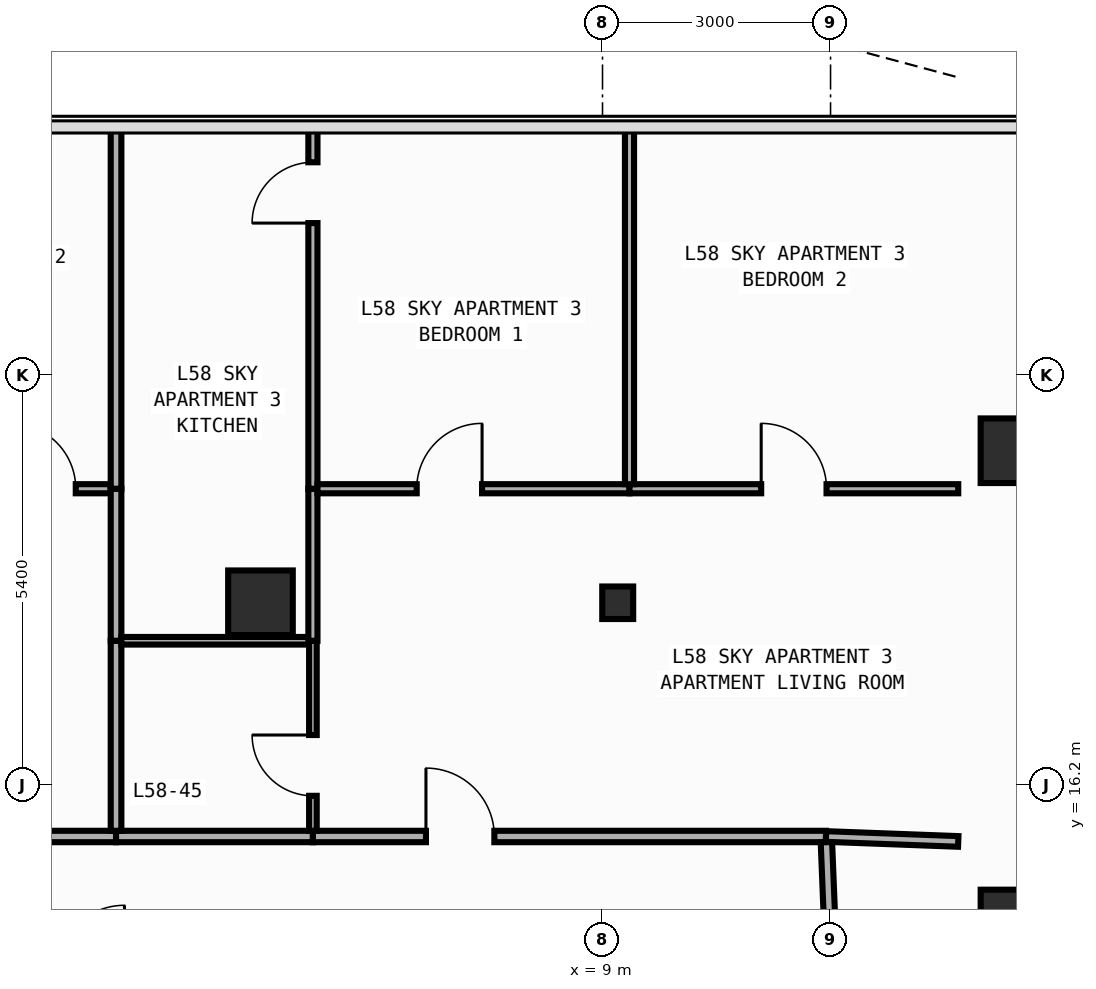
"""IFC4 building model, lengths in metres.
Left out: names, types, materials, properties, quantities, classifications, styles, units other than length and angle.
Written with IfcOpenShell. Run it as: python <this file> out.ifc"""

import sys

from ifc_helpers import new_model, si_unit, direction, frame, frame_2d, origin, origin_2d, place, context, subcontext, project, spatial, rectangle, i_section, extrude, element, fill, save


model = new_model("IFC4")
c1 = context("Model", 3, precision=1e-05, world=origin(), true_north=direction((0.0, 1.0)))
c2 = subcontext(c1, "Body", "Model", "MODEL_VIEW")
j1 = project(units=[si_unit("LENGTHUNIT", "METRE"), si_unit("PLANEANGLEUNIT", "RADIAN")], contexts=[c1])
p1 = place(None, origin())
s1 = spatial("IfcSite", under=j1, at=p1, CompositionType="ELEMENT")
p2 = place(p1, origin())
s2 = spatial("IfcBuilding", under=s1, at=p2, CompositionType="ELEMENT")
p3 = place(p2, frame((0.0, 0.0, 247.6)))
s3 = spatial("IfcBuildingStorey", under=s2, at=p3, CompositionType="ELEMENT", Elevation=247.6)
p4 = place(p3, frame((9.2, 18.6, 0.0), z_axis=(0.0, 0.0, 1.0), x_axis=(1.0, 0.0, 0.0)))
e1 = element("IfcColumn", 1, at=p4, inside=s3, PredefinedType="COLUMN", context=c2, shape_type="SweptSolid", body=[
    extrude(i_section(OverallWidth=0.407, OverallDepth=0.428, WebThickness=0.02, FlangeThickness=0.035, FilletRadius=0.022, at=origin_2d()), origin(), (0.0, 0.0, 1.0), 3.6),
])
for number, where, z_axis, x_axis in (
    (2, (14.4, 14.4, 0.0), (0.0, 0.0, 1.0), (1.0, 0.0, 0.0)),
    (3, (4.5, 18.6, 0.0), (0.0, 0.0, 1.0), (1.0, 0.0, 0.0)),
    (4, (14.4, 20.6, 0.0), (0.0, 0.0, 1.0), (1.0, 0.0, 0.0)),
):
    element("IfcColumn", number, at=place(p3, frame(where, z_axis=z_axis, x_axis=x_axis)), inside=s3, PredefinedType="COLUMN", context=c2, shape_type="SweptSolid", body=[
        extrude(rectangle(XDim=0.85, YDim=0.85, at=origin_2d()), origin(), (0.0, 0.0, 1.0), 3.6),
    ])
p5 = place(p3, frame((-5.51, 15.525, 0.0), z_axis=(0.0, 0.0, 1.0), x_axis=(1.0, 0.0, 0.0)))
e5 = element("IfcWall", 5, at=p5, inside=s3, PredefinedType="PARTITIONING", context=c2, shape_type="SweptSolid", body=[
    extrude(rectangle(XDim=8.11, YDim=0.15, at=frame_2d((4.055, 0.0))), origin(), (0.0, 0.0, 1.0), 3.34),
])
p6 = place(p5, frame((2.895, 0.0, 0.0)))
e6 = element("IfcOpeningElement", 6, at=p6, cuts=e5, PredefinedType="OPENING", context=c2, shape_type="SweptSolid", body=[
    extrude(rectangle(XDim=0.9, YDim=2.15, at=frame_2d((0.45, 1.075))), frame((0.0, 0.085, 0.0), z_axis=(0.0, -1.0, 0.0), x_axis=(1.0, 0.0, 0.0)), (0.0, 0.0, 1.0), 0.17),
])
p7 = place(p3, frame((2.6, 15.525, 0.0), z_axis=(0.0, 0.0, 1.0), x_axis=(1.0, 0.0, 0.0)))
e7 = element("IfcWall", 7, at=p7, inside=s3, PredefinedType="PARTITIONING", context=c2, shape_type="SweptSolid", body=[
    extrude(rectangle(XDim=2.59, YDim=0.15, at=frame_2d((1.295, 0.0))), origin(), (0.0, 0.0, 1.0), 3.34),
])
p8 = place(p3, frame((5.19, 15.525, 0.0), z_axis=(0.0, 0.0, 1.0), x_axis=(1.0, 0.0, 0.0)))
e8 = element("IfcWall", 8, at=p8, inside=s3, PredefinedType="PARTITIONING", context=c2, shape_type="SweptSolid", body=[
    extrude(rectangle(XDim=6.75, YDim=0.15, at=frame_2d((3.375, 0.0))), origin(), (0.0, 0.0, 1.0), 3.34),
])
p9 = place(p8, frame((1.487, 0.0, 0.0)))
e9 = element("IfcOpeningElement", 9, at=p9, cuts=e8, PredefinedType="OPENING", context=c2, shape_type="SweptSolid", body=[
    extrude(rectangle(XDim=0.9, YDim=2.15, at=frame_2d((0.45, 1.075))), frame((0.0, 0.085, 0.0), z_axis=(0.0, -1.0, 0.0), x_axis=(1.0, 0.0, 0.0)), (0.0, 0.0, 1.0), 0.17),
])
p10 = place(p3, frame((12.015, 13.72, 0.0), z_axis=(0.0, 0.0, 1.0), x_axis=(-0.040046877756, 0.99919780203, 0.0)))
e10 = element("IfcWall", 10, at=p10, inside=s3, PredefinedType="PARTITIONING", context=c2, shape_type="SweptSolid", body=[
    extrude(rectangle(XDim=1.731, YDim=0.15, at=frame_2d((0.866, 0.0))), origin(), (0.0, 0.0, 1.0), 3.34),
])
p11 = place(p3, frame((-1.495, 20.1, 0.0), z_axis=(0.0, 0.0, 1.0), x_axis=(1.0, 0.0, 0.0)))
e11 = element("IfcWall", 11, at=p11, inside=s3, PredefinedType="PARTITIONING", context=c2, shape_type="SweptSolid", body=[
    extrude(rectangle(XDim=4.025, YDim=0.12, at=frame_2d((2.013, 0.0))), origin(), (0.0, 0.0, 1.0), 3.34),
])
p12 = place(p11, frame((2.705, 0.0, 0.0)))
e12 = element("IfcOpeningElement", 12, at=p12, cuts=e11, PredefinedType="OPENING", context=c2, shape_type="SweptSolid", body=[
    extrude(rectangle(XDim=0.86, YDim=2.15, at=frame_2d((0.43, 1.075))), frame((0.0, 0.07, 0.0), z_axis=(0.0, -1.0, 0.0), x_axis=(1.0, 0.0, 0.0)), (0.0, 0.0, 1.0), 0.14),
])
p13 = place(p3, frame((2.6, 15.6, 0.0), z_axis=(0.0, 0.0, 1.0), x_axis=(0.0, 1.0, 0.0)))
e13 = element("IfcWall", 13, at=p13, inside=s3, PredefinedType="PARTITIONING", context=c2, shape_type="SweptSolid", body=[
    extrude(rectangle(XDim=2.5, YDim=0.14, at=frame_2d((1.25, 0.0))), origin(), (0.0, 0.0, 1.0), 3.34),
])
p14 = place(p3, frame((2.6, 18.1, 0.0), z_axis=(0.0, 0.0, 1.0), x_axis=(0.0, 1.0, 0.0)))
e14 = element("IfcWall", 14, at=p14, inside=s3, PredefinedType="PARTITIONING", context=c2, shape_type="SweptSolid", body=[
    extrude(rectangle(XDim=2.0, YDim=0.14, at=frame_2d((1.0, 0.0))), origin(), (0.0, 0.0, 1.0), 3.34),
])
p15 = place(p3, frame((2.6, 20.1, 0.0), z_axis=(0.0, 0.0, 1.0), x_axis=(0.0, 1.0, 0.0)))
e15 = element("IfcWall", 15, at=p15, inside=s3, PredefinedType="PARTITIONING", context=c2, shape_type="SweptSolid", body=[
    extrude(rectangle(XDim=4.755, YDim=0.14, at=frame_2d((2.377, 0.0))), origin(), (0.0, 0.0, 1.0), 3.34),
])
p16 = place(p3, frame((2.67, 18.1, 0.0), z_axis=(0.0, 0.0, 1.0), x_axis=(1.0, 0.0, 0.0)))
e16 = element("IfcWall", 16, at=p16, inside=s3, PredefinedType="PARTITIONING", context=c2, shape_type="SweptSolid", body=[
    extrude(rectangle(XDim=2.47, YDim=0.1, at=frame_2d((1.235, 0.0))), origin(), (0.0, 0.0, 1.0), 3.34),
])
p17 = place(p3, frame((5.19, 15.6, 0.0), z_axis=(0.0, 0.0, 1.0), x_axis=(0.0, 1.0, 0.0)))
e17 = element("IfcWall", 17, at=p17, inside=s3, PredefinedType="PARTITIONING", context=c2, shape_type="SweptSolid", body=[
    extrude(rectangle(XDim=2.5, YDim=0.1, at=frame_2d((1.25, 0.0))), origin(), (0.0, 0.0, 1.0), 3.34),
])
p18 = place(p17, frame((0.46, 0.0, 0.0)))
e18 = element("IfcOpeningElement", 18, at=p18, cuts=e17, PredefinedType="OPENING", context=c2, shape_type="SweptSolid", body=[
    extrude(rectangle(XDim=0.8, YDim=2.1, at=frame_2d((0.4, 1.05))), frame((0.0, 0.06, 0.0), z_axis=(0.0, -1.0, 0.0), x_axis=(1.0, 0.0, 0.0)), (0.0, 0.0, 1.0), 0.12),
])
p19 = place(p3, frame((5.19, 18.1, 0.0), z_axis=(0.0, 0.0, 1.0), x_axis=(0.0, 1.0, 0.0)))
e19 = element("IfcWall", 19, at=p19, inside=s3, PredefinedType="PARTITIONING", context=c2, shape_type="SweptSolid", body=[
    extrude(rectangle(XDim=2.0, YDim=0.12, at=frame_2d((1.0, 0.0))), origin(), (0.0, 0.0, 1.0), 3.34),
])
p20 = place(p3, frame((5.19, 20.1, 0.0), z_axis=(0.0, 0.0, 1.0), x_axis=(0.0, 1.0, 0.0)))
e20 = element("IfcWall", 20, at=p20, inside=s3, PredefinedType="PARTITIONING", context=c2, shape_type="SweptSolid", body=[
    extrude(rectangle(XDim=4.755, YDim=0.12, at=frame_2d((2.377, 0.0))), origin(), (0.0, 0.0, 1.0), 3.34),
])
p21 = place(p20, frame((3.495, 0.0, 0.0)))
e21 = element("IfcOpeningElement", 21, at=p21, cuts=e20, PredefinedType="OPENING", context=c2, shape_type="SweptSolid", body=[
    extrude(rectangle(XDim=0.8, YDim=2.1, at=frame_2d((0.4, 1.05))), frame((0.0, 0.07, 0.0), z_axis=(0.0, -1.0, 0.0), x_axis=(1.0, 0.0, 0.0)), (0.0, 0.0, 1.0), 0.14),
])
p22 = place(p3, frame((5.25, 20.1, 0.0), z_axis=(0.0, 0.0, 1.0), x_axis=(1.0, 0.0, 0.0)))
e22 = element("IfcWall", 22, at=p22, inside=s3, PredefinedType="PARTITIONING", context=c2, shape_type="SweptSolid", body=[
    extrude(rectangle(XDim=4.105, YDim=0.12, at=frame_2d((2.052, 0.0))), origin(), (0.0, 0.0, 1.0), 3.34),
])
p23 = place(p22, frame((1.305, 0.0, 0.0)))
e23 = element("IfcOpeningElement", 23, at=p23, cuts=e22, PredefinedType="OPENING", context=c2, shape_type="SweptSolid", body=[
    extrude(rectangle(XDim=0.86, YDim=2.15, at=frame_2d((0.43, 1.075))), frame((0.0, 0.07, 0.0), z_axis=(0.0, -1.0, 0.0), x_axis=(1.0, 0.0, 0.0)), (0.0, 0.0, 1.0), 0.14),
])
p24 = place(p3, frame((9.355, 20.1, 0.0), z_axis=(0.0, 0.0, 1.0), x_axis=(1.0, 0.0, 0.0)))
e24 = element("IfcWall", 24, at=p24, inside=s3, PredefinedType="PARTITIONING", context=c2, shape_type="SweptSolid", body=[
    extrude(rectangle(XDim=4.325, YDim=0.12, at=frame_2d((2.163, 0.0))), origin(), (0.0, 0.0, 1.0), 3.34),
])
p25 = place(p24, frame((1.732, 0.0, 0.0)))
e25 = element("IfcOpeningElement", 25, at=p25, cuts=e24, PredefinedType="OPENING", context=c2, shape_type="SweptSolid", body=[
    extrude(rectangle(XDim=0.86, YDim=2.15, at=frame_2d((0.43, 1.075))), frame((0.0, 0.07, 0.0), z_axis=(0.0, -1.0, 0.0), x_axis=(1.0, 0.0, 0.0)), (0.0, 0.0, 1.0), 0.14),
])
p26 = place(p3, frame((11.94, 15.525, 0.0), z_axis=(0.0, 0.0, 1.0), x_axis=(0.999304229002, -0.037296888581, 0.0)))
e26 = element("IfcWall", 26, at=p26, inside=s3, PredefinedType="PARTITIONING", context=c2, shape_type="SweptSolid", body=[
    extrude(rectangle(XDim=1.741, YDim=0.14, at=frame_2d((0.871, 0.0))), origin(), (0.0, 0.0, 1.0), 3.34),
])
p27 = place(p3, frame((9.355, 20.16, 0.0), z_axis=(0.0, 0.0, 1.0), x_axis=(0.0, 1.0, 0.0)))
e27 = element("IfcWall", 27, at=p27, inside=s3, PredefinedType="PARTITIONING", context=c2, shape_type="SweptSolid", body=[
    extrude(rectangle(XDim=4.695, YDim=0.12, at=frame_2d((2.348, 0.0))), origin(), (0.0, 0.0, 1.0), 3.34),
])
p28 = place(p9, origin())
e28 = element("IfcDoor", 28, at=p28, inside=s3, OperationType="SINGLE_SWING_LEFT", PredefinedType="DOOR", context=c2, shape_type="SweptSolid", body=[
    extrude(rectangle(XDim=0.9, YDim=2.15, at=frame_2d((0.45, 1.075))), frame((0.0, 0.025, 0.0), z_axis=(0.0, -1.0, 0.0), x_axis=(1.0, 0.0, 0.0)), (0.0, 0.0, 1.0), 0.05),
])
fill(e9, e28)
p29 = place(p12, origin())
e29 = element("IfcDoor", 29, at=p29, inside=s3, OperationType="SINGLE_SWING_LEFT", PredefinedType="DOOR", context=c2, shape_type="SweptSolid", body=[
    extrude(rectangle(XDim=0.86, YDim=2.15, at=frame_2d((0.43, 1.075))), frame((0.0, 0.025, 0.0), z_axis=(0.0, -1.0, 0.0), x_axis=(1.0, 0.0, 0.0)), (0.0, 0.0, 1.0), 0.05),
])
fill(e12, e29)
p30 = place(p18, origin())
e30 = element("IfcDoor", 30, at=p30, inside=s3, OperationType="SINGLE_SWING_RIGHT", PredefinedType="DOOR", context=c2, shape_type="SweptSolid", body=[
    extrude(rectangle(XDim=0.8, YDim=2.1, at=frame_2d((0.4, 1.05))), frame((0.0, 0.025, 0.0), z_axis=(0.0, -1.0, 0.0), x_axis=(1.0, 0.0, 0.0)), (0.0, 0.0, 1.0), 0.05),
])
fill(e18, e30)
p31 = place(p23, origin())
e31 = element("IfcDoor", 31, at=p31, inside=s3, OperationType="SINGLE_SWING_RIGHT", PredefinedType="DOOR", context=c2, shape_type="SweptSolid", body=[
    extrude(rectangle(XDim=0.86, YDim=2.15, at=frame_2d((0.43, 1.075))), frame((0.0, 0.025, 0.0), z_axis=(0.0, -1.0, 0.0), x_axis=(1.0, 0.0, 0.0)), (0.0, 0.0, 1.0), 0.05),
])
fill(e23, e31)
p32 = place(p25, origin())
e32 = element("IfcDoor", 32, at=p32, inside=s3, OperationType="SINGLE_SWING_LEFT", PredefinedType="DOOR", context=c2, shape_type="SweptSolid", body=[
    extrude(rectangle(XDim=0.86, YDim=2.15, at=frame_2d((0.43, 1.075))), frame((0.0, 0.025, 0.0), z_axis=(0.0, -1.0, 0.0), x_axis=(1.0, 0.0, 0.0)), (0.0, 0.0, 1.0), 0.05),
])
fill(e25, e32)
p33 = place(p21, origin())
e33 = element("IfcDoor", 33, at=p33, inside=s3, OperationType="SINGLE_SWING_LEFT", PredefinedType="DOOR", context=c2, shape_type="SweptSolid", body=[
    extrude(rectangle(XDim=0.8, YDim=2.1, at=frame_2d((0.4, 1.05))), frame((0.0, 0.025, 0.0), z_axis=(0.0, -1.0, 0.0), x_axis=(1.0, 0.0, 0.0)), (0.0, 0.0, 1.0), 0.05),
])
fill(e21, e33)
save(model, sys.argv[1])
